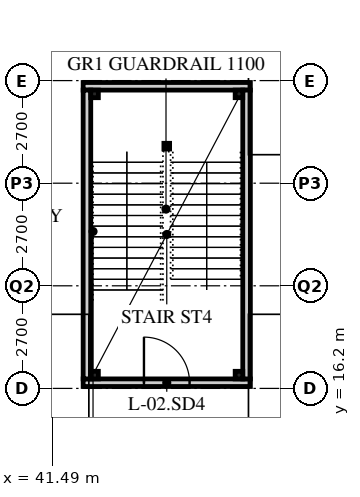
"""IFC4 building model, lengths in metres.
Left out: names, types, materials, properties, quantities, classifications, styles, units other than length and angle.
Written with IfcOpenShell. Run it as: python <this file> out.ifc"""

import sys

from ifc_helpers import new_model, si_unit, direction, frame, frame_2d, origin, origin_2d, place, context, subcontext, project, spatial, rectangle, hollow_rectangle, extrude, element, fill, save


model = new_model("IFC4")
c1 = context("Model", 3, precision=1e-05, world=origin(), true_north=direction((0.0, 1.0)))
c2 = subcontext(c1, "Body", "Model", "MODEL_VIEW")
j1 = project(units=[si_unit("LENGTHUNIT", "METRE"), si_unit("PLANEANGLEUNIT", "RADIAN")], contexts=[c1])
p1 = place(None, origin())
s1 = spatial("IfcSite", under=j1, at=p1, CompositionType="ELEMENT")
p2 = place(p1, origin())
s2 = spatial("IfcBuilding", under=s1, at=p2, CompositionType="ELEMENT")
p3 = place(p2, frame((0.0, 0.0, -8.4)))
s3 = spatial("IfcBuildingStorey", under=s2, at=p3, CompositionType="ELEMENT", Elevation=-8.4)
p4 = place(p3, frame((42.3, 16.35, 0.0), z_axis=(0.0, 0.0, 1.0), x_axis=(1.0, 0.0, 0.0)))
e1 = element("IfcWall", 1, at=p4, inside=s3, PredefinedType="SOLIDWALL", context=c2, shape_type="SweptSolid", body=[
    extrude(rectangle(XDim=4.4, YDim=0.2, at=frame_2d((2.2, 0.0))), origin(), (0.0, 0.0, 1.0), 3.338),
])
p5 = place(p4, frame((1.6, 0.0, 0.0)))
e2 = element("IfcOpeningElement", 2, at=p5, cuts=e1, PredefinedType="OPENING", context=c2, shape_type="SweptSolid", body=[
    extrude(rectangle(XDim=1.2, YDim=2.1, at=frame_2d((0.6, 1.05))), frame((0.0, 0.11, 0.0), z_axis=(0.0, -1.0, 0.0), x_axis=(1.0, 0.0, 0.0)), (0.0, 0.0, 1.0), 0.22),
])
p6 = place(p3, frame((42.3, 24.15, 0.0), z_axis=(0.0, 0.0, 1.0), x_axis=(1.0, 0.0, 0.0)))
e3 = element("IfcWall", 3, at=p6, inside=s3, PredefinedType="SOLIDWALL", context=c2, shape_type="SweptSolid", body=[
    extrude(rectangle(XDim=4.4, YDim=0.2, at=frame_2d((2.2, 0.0))), origin(), (0.0, 0.0, 1.0), 3.338),
])
for number, where, z_axis, x_axis in (
    (4, (42.4, 16.45, 0.0), (0.0, 0.0, 1.0), (0.0, 1.0, 0.0)),
    (5, (46.6, 16.45, 0.0), (0.0, 0.0, 1.0), (0.0, 1.0, 0.0)),
):
    element("IfcWall", number, at=place(p3, frame(where, z_axis=z_axis, x_axis=x_axis)), inside=s3, PredefinedType="SOLIDWALL", context=c2, shape_type="SweptSolid", body=[
        extrude(rectangle(XDim=7.6, YDim=0.2, at=frame_2d((3.8, 0.0))), origin(), (0.0, 0.0, 1.0), 3.95),
    ])
for number, where, z_axis, x_axis in (
    (6, (42.6, 23.95, 0.0), (0.0, 0.0, 1.0), (1.0, 0.0, 0.0)),
    (7, (46.4, 23.95, 0.0), (0.0, 0.0, 1.0), (1.0, 0.0, 0.0)),
    (8, (42.6, 16.55, 0.0), (0.0, 0.0, 1.0), (1.0, 0.0, 0.0)),
    (9, (46.4, 16.55, 0.0), (0.0, 0.0, 1.0), (1.0, 0.0, 0.0)),
):
    element("IfcColumn", number, at=place(p3, frame(where, z_axis=z_axis, x_axis=x_axis)), inside=s3, PredefinedType="COLUMN", context=c2, shape_type="SweptSolid", body=[
        extrude(hollow_rectangle(XDim=0.2, YDim=0.2, WallThickness=0.012, at=origin_2d()), origin(), (0.0, 0.0, 1.0), 4.2),
    ])
p7 = place(p3, frame((44.5, 22.575, 0.0), z_axis=(0.0, 0.0, 1.0), x_axis=(1.0, 0.0, 0.0)))
e10 = element("IfcColumn", 10, at=p7, inside=s3, PredefinedType="COLUMN", context=c2, shape_type="SweptSolid", body=[
    extrude(hollow_rectangle(XDim=0.15, YDim=0.15, WallThickness=0.01, at=origin_2d()), origin(), (0.0, 0.0, 1.0), 4.2),
])
p8 = place(p5, origin())
e11 = element("IfcDoor", 11, at=p8, inside=s3, OperationType="SINGLE_SWING_LEFT", PredefinedType="DOOR", context=c2, shape_type="SweptSolid", body=[
    extrude(rectangle(XDim=1.2, YDim=2.1, at=frame_2d((0.6, 1.05))), frame((0.0, 0.025, 0.0), z_axis=(0.0, -1.0, 0.0), x_axis=(1.0, 0.0, 0.0)), (0.0, 0.0, 1.0), 0.05),
])
fill(e2, e11)
save(model, sys.argv[1])
